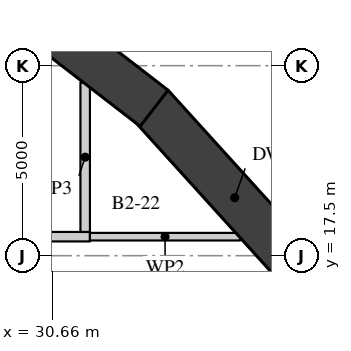
"""IFC4 building model, lengths in metres.
Left out: names, types, materials, properties, quantities, classifications, styles, units other than length and angle.
Written with IfcOpenShell. Run it as: python <this file> out.ifc"""

import sys

from ifc_helpers import new_model, si_unit, direction, frame, frame_2d, origin, place, context, subcontext, project, spatial, rectangle, extrude, element, save


model = new_model("IFC4")
c1 = context("Model", 3, precision=1e-05, world=origin(), true_north=direction((0.0, 1.0)))
c2 = subcontext(c1, "Body", "Model", "MODEL_VIEW")
j1 = project(units=[si_unit("LENGTHUNIT", "METRE"), si_unit("PLANEANGLEUNIT", "RADIAN")], contexts=[c1])
p1 = place(None, origin())
s1 = spatial("IfcSite", under=j1, at=p1, CompositionType="ELEMENT")
p2 = place(p1, origin())
s2 = spatial("IfcBuilding", under=s1, at=p2, CompositionType="ELEMENT")
p3 = place(p2, frame((0.0, 0.0, -10.4)))
s3 = spatial("IfcBuildingStorey", under=s2, at=p3, CompositionType="ELEMENT", Elevation=-10.4)
p4 = place(p3, frame((37.657, 16.601, 0.0), z_axis=(0.0, 0.0, 1.0), x_axis=(-0.671487423502, 0.741015951299, 0.0)))
e1 = element("IfcWall", 1, at=p4, inside=s3, PredefinedType="USERDEFINED", context=c2, shape_type="SweptSolid", body=[
    extrude(rectangle(XDim=6.545, YDim=1.2, at=frame_2d((3.272, 0.0))), origin(), (0.0, 0.0, 1.0), 5.2),
])
p5 = place(p3, frame((33.339, 21.38, 0.0), z_axis=(0.0, 0.0, 1.0), x_axis=(-0.791286567459, 0.611445474396, 0.0)))
e2 = element("IfcWall", 2, at=p5, inside=s3, PredefinedType="USERDEFINED", context=c2, shape_type="SweptSolid", body=[
    extrude(rectangle(XDim=6.857, YDim=1.2, at=frame_2d((3.428, 0.0))), origin(), (0.0, 0.0, 1.0), 5.2),
])
p6 = place(p3, frame((26.675, 18.0, 0.0), z_axis=(0.0, 0.0, 1.0), x_axis=(1.0, 0.0, 0.0)))
e3 = element("IfcWall", 3, at=p6, inside=s3, PredefinedType="PARTITIONING", context=c2, shape_type="SweptSolid", body=[
    extrude(rectangle(XDim=4.975, YDim=0.25, at=frame_2d((2.487, 0.0))), origin(), (0.0, 0.0, 1.0), 4.75),
])
p7 = place(p6, frame((1.988, 0.0, 0.0)))
e4 = element("IfcOpeningElement", 4, at=p7, cuts=e3, PredefinedType="OPENING", context=c2, shape_type="SweptSolid", body=[
    extrude(rectangle(XDim=1.0, YDim=2.1, at=frame_2d((0.5, 1.05))), frame((0.0, 0.135, 0.0), z_axis=(0.0, -1.0, 0.0), x_axis=(1.0, 0.0, 0.0)), (0.0, 0.0, 1.0), 0.27),
])
p8 = place(p3, frame((31.65, 18.0, 0.0), z_axis=(0.0, 0.0, 1.0), x_axis=(1.0, 0.0, 0.0)))
e5 = element("IfcWall", 5, at=p8, inside=s3, PredefinedType="PARTITIONING", context=c2, shape_type="SweptSolid", body=[
    extrude(rectangle(XDim=3.956, YDim=0.2, at=frame_2d((1.978, 0.0))), origin(), (0.0, 0.0, 1.0), 4.75),
])
p9 = place(p3, frame((31.525, 18.125, 0.0), z_axis=(0.0, 0.0, 1.0), x_axis=(0.0, 1.0, 0.0)))
e6 = element("IfcWall", 6, at=p9, inside=s3, PredefinedType="PARTITIONING", context=c2, shape_type="SweptSolid", body=[
    extrude(rectangle(XDim=3.935, YDim=0.25, at=frame_2d((1.967, 0.0))), origin(), (0.0, 0.0, 1.0), 4.75),
])
save(model, sys.argv[1])
